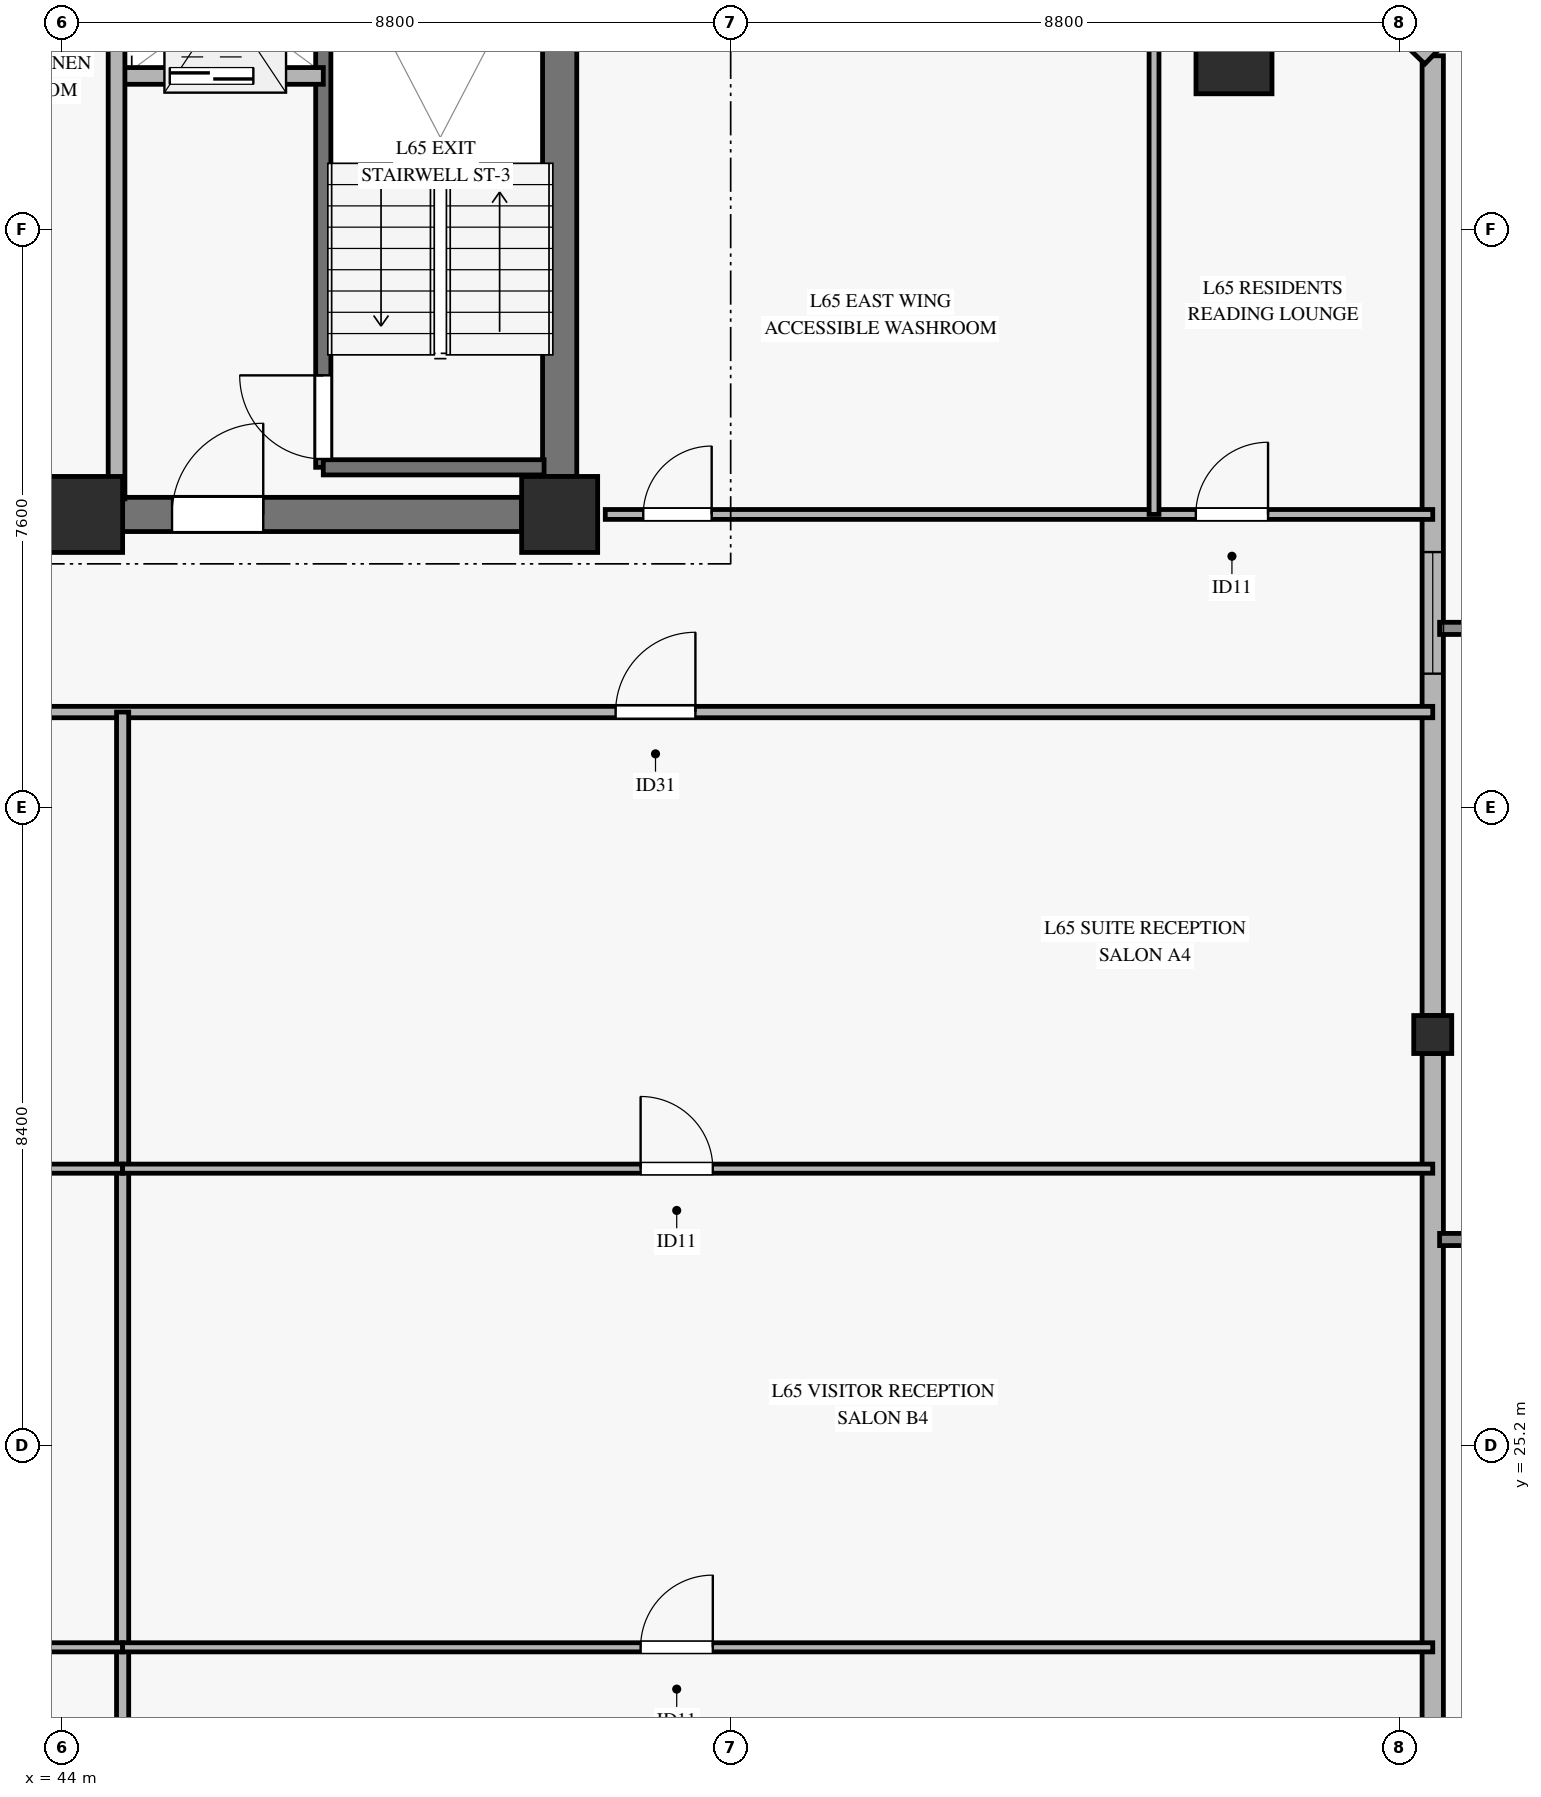
"""IFC4 building model, lengths in metres.
Left out: names, types, materials, properties, quantities, classifications, styles, units other than length and angle.
Written with IfcOpenShell. Run it as: python <this file> out.ifc"""

import sys

from ifc_helpers import new_model, si_unit, direction, frame, frame_2d, origin, origin_2d, place, context, subcontext, project, spatial, rectangle, hollow_rectangle, extrude, source, transform, mapped, element, fill, save


model = new_model("IFC4")
c1 = context("Model", 3, precision=1e-05, world=origin(), true_north=direction((0.0, 1.0)))
c2 = subcontext(c1, "Body", "Model", "MODEL_VIEW")
j1 = project(units=[si_unit("LENGTHUNIT", "METRE"), si_unit("PLANEANGLEUNIT", "RADIAN")], contexts=[c1])
p1 = place(None, origin())
s1 = spatial("IfcSite", under=j1, at=p1, CompositionType="ELEMENT")
p2 = place(p1, origin())
s2 = spatial("IfcBuilding", under=s1, at=p2, CompositionType="ELEMENT")
p3 = place(p2, frame((0.0, 0.0, 255.3)))
s3 = spatial("IfcBuildingStorey", under=s2, at=p3, CompositionType="ELEMENT", Elevation=255.3)
m1 = source(origin(), c2, "Body", "SweptSolid", [
    extrude(rectangle(XDim=1.0, YDim=1.0, at=origin_2d()), origin(), (0.0, 0.0, 1.0), 3.185),
])
for number, where, z_axis, x_axis in (
    (1, (44.3, 37.45, 0.0), (0.0, 0.0, 1.0), (1.0, 0.0, 0.0)),
    (2, (50.55, 37.45, 0.0), (0.0, 0.0, 1.0), (1.0, 0.0, 0.0)),
):
    element("IfcColumn", number, at=place(p3, frame(where, z_axis=z_axis, x_axis=x_axis)), inside=s3, PredefinedType="PILASTER", context=c2, shape_type="MappedRepresentation", body=[
        mapped(m1, transform((0.0, 0.0, 0.0), x_axis=(1.0, 0.0, 0.0), y_axis=(0.0, 1.0, 0.0), z_axis=(0.0, 0.0, 1.0), scale=1.0)),
    ])
p4 = place(p3, frame((44.8, 37.45, 0.0), z_axis=(0.0, 0.0, 1.0), x_axis=(1.0, 0.0, 0.0)))
e3 = element("IfcWall", 3, at=p4, inside=s3, PredefinedType="SHEAR", context=c2, shape_type="SweptSolid", body=[
    extrude(rectangle(XDim=5.25, YDim=0.45, at=frame_2d((2.625, 0.0))), origin(), (0.0, 0.0, 1.0), 3.185),
])
p5 = place(p4, frame((0.65, 0.0, 0.0)))
e4 = element("IfcOpeningElement", 4, at=p5, cuts=e3, PredefinedType="OPENING", context=c2, shape_type="SweptSolid", body=[
    extrude(rectangle(XDim=1.2, YDim=2.15, at=frame_2d((0.6, 1.075))), frame((0.0, 0.235, 0.0), z_axis=(0.0, -1.0, 0.0), x_axis=(1.0, 0.0, 0.0)), (0.0, 0.0, 1.0), 0.47),
])
p6 = place(p3, frame((50.55, 37.95, 0.0), z_axis=(0.0, 0.0, 1.0), x_axis=(0.0, 1.0, 0.0)))
e5 = element("IfcWall", 5, at=p6, inside=s3, PredefinedType="SHEAR", context=c2, shape_type="SweptSolid", body=[
    extrude(rectangle(XDim=8.1, YDim=0.45, at=frame_2d((4.05, 0.0))), origin(), (0.0, 0.0, 1.0), 3.185),
])
m2 = source(origin(), c2, "Body", "SweptSolid", [
    extrude(hollow_rectangle(XDim=1.0, YDim=1.0, WallThickness=0.045, at=origin_2d()), origin(), (0.0, 0.0, 1.0), 3.207),
])
p7 = place(p3, frame((59.422, 43.485, 0.0), z_axis=(-0.115115667947, 0.014008784988, 0.993253309552), x_axis=(-0.120801918231, -0.99267663242, 0.0)))
e6 = element("IfcColumn", 6, at=p7, inside=s3, PredefinedType="COLUMN", context=c2, shape_type="MappedRepresentation", body=[
    mapped(m2, transform((0.0, 0.0, 0.0), x_axis=(1.0, 0.0, 0.0), y_axis=(0.0, 1.0, 0.0), z_axis=(0.0, 0.0, 1.0), scale=1.0)),
])
m3 = source(origin(), c2, "Body", "SweptSolid", [
    extrude(hollow_rectangle(XDim=0.5, YDim=0.5, WallThickness=0.024, at=origin_2d()), origin(), (0.0, 0.0, 1.0), 3.245),
])
p8 = place(p3, frame((62.037, 30.607, 0.0), z_axis=(-0.12788204807, 0.143303118572, 0.981381881832), x_axis=(-0.7461113674, -0.665821167759, 0.0)))
e7 = element("IfcColumn", 7, at=p8, inside=s3, PredefinedType="COLUMN", context=c2, shape_type="MappedRepresentation", body=[
    mapped(m3, transform((0.0, 0.0, 0.0), x_axis=(1.0, 0.0, 0.0), y_axis=(0.0, 1.0, 0.0), z_axis=(0.0, 0.0, 1.0), scale=1.0)),
])
p9 = place(p3, frame((62.037, 17.728, 0.0), z_axis=(0.0, 0.0, 1.0), x_axis=(0.0, 1.0, 0.0)))
e8 = element("IfcWall", 8, at=p9, inside=s3, PredefinedType="SOLIDWALL", context=c2, shape_type="SweptSolid", body=[
    extrude(rectangle(XDim=12.629, YDim=0.28, at=frame_2d((6.314, 0.0))), origin(), (0.0, 0.0, 1.0), 2.815),
])
p10 = place(p3, frame((62.037, 30.857, 0.0), z_axis=(0.0, 0.0, 1.0), x_axis=(0.0, 1.0, 0.0)))
e9 = element("IfcWall", 9, at=p10, inside=s3, PredefinedType="SOLIDWALL", context=c2, shape_type="SweptSolid", body=[
    extrude(rectangle(XDim=12.628, YDim=0.28, at=frame_2d((6.314, 0.0))), origin(), (0.0, 0.0, 1.0), 2.815),
])
p11 = place(p10, frame((4.498, 0.0, 0.45)))
e10 = element("IfcOpeningElement", 10, at=p11, cuts=e9, PredefinedType="OPENING", context=c2, shape_type="SweptSolid", body=[
    extrude(rectangle(XDim=1.6, YDim=2.0, at=frame_2d((0.8, 1.0))), frame((0.0, 0.15, 0.0), z_axis=(0.0, -1.0, 0.0), x_axis=(1.0, 0.0, 0.0)), (0.0, 0.0, 1.0), 0.3),
])
p12 = place(p3, frame((62.037, 43.485, 0.0), z_axis=(0.0, 0.0, 1.0), x_axis=(-0.719565206503, 0.694424879731, 0.0)))
e11 = element("IfcWall", 11, at=p12, inside=s3, PredefinedType="SOLIDWALL", context=c2, shape_type="SweptSolid", body=[
    extrude(rectangle(XDim=3.981, YDim=0.3, at=frame_2d((1.991, 0.0))), origin(), (0.0, 0.0, 1.0), 2.815),
])
p13 = place(p12, frame((1.191, 0.0, 0.45)))
e12 = element("IfcOpeningElement", 12, at=p13, cuts=e11, PredefinedType="OPENING", context=c2, shape_type="SweptSolid", body=[
    extrude(rectangle(XDim=1.6, YDim=2.0, at=frame_2d((0.8, 1.0))), frame((0.0, 0.16, 0.0), z_axis=(0.0, -1.0, 0.0), x_axis=(1.0, 0.0, 0.0)), (0.0, 0.0, 1.0), 0.32),
])
p14 = place(p3, frame((47.44, 38.07, 0.0), z_axis=(0.0, 0.0, 1.0), x_axis=(0.0, 1.0, 0.0)))
e13 = element("IfcWall", 13, at=p14, inside=s3, PredefinedType="SOLIDWALL", context=c2, shape_type="SweptSolid", body=[
    extrude(rectangle(XDim=7.25, YDim=0.2, at=frame_2d((3.625, 0.0))), origin(), (0.0, 0.0, 1.0), 3.4),
])
p15 = place(p14, frame((0.11, 0.0, 0.0)))
e14 = element("IfcOpeningElement", 14, at=p15, cuts=e13, PredefinedType="OPENING", context=c2, shape_type="SweptSolid", body=[
    extrude(rectangle(XDim=1.1, YDim=2.15, at=frame_2d((0.55, 1.075))), frame((0.0, 0.11, 0.0), z_axis=(0.0, -1.0, 0.0), x_axis=(1.0, 0.0, 0.0)), (0.0, 0.0, 1.0), 0.22),
])
p16 = place(p3, frame((47.44, 38.07, 0.0), z_axis=(0.0, 0.0, 1.0), x_axis=(1.0, 0.0, 0.0)))
e15 = element("IfcWall", 15, at=p16, inside=s3, PredefinedType="SOLIDWALL", context=c2, shape_type="SweptSolid", body=[
    extrude(rectangle(XDim=2.905, YDim=0.2, at=frame_2d((1.453, 0.0))), origin(), (0.0, 0.0, 1.0), 3.4),
])
p17 = place(p3, frame((44.72, 43.22, 0.0), z_axis=(0.0, 0.0, 1.0), x_axis=(1.0, 0.0, 0.0)))
e16 = element("IfcWall", 16, at=p17, inside=s3, PredefinedType="SOLIDWALL", context=c2, shape_type="SweptSolid", body=[
    extrude(rectangle(XDim=2.72, YDim=0.22, at=frame_2d((1.36, 0.0))), origin(), (0.0, 0.0, 1.0), 3.185),
])
p18 = place(p17, frame((0.7, 0.0, 0.0)))
e17 = element("IfcOpeningElement", 17, at=p18, cuts=e16, PredefinedType="OPENING", context=c2, shape_type="SweptSolid", body=[
    extrude(rectangle(XDim=1.1, YDim=2.2, at=frame_2d((0.55, 1.1))), frame((0.0, 0.12, 0.0), z_axis=(0.0, -1.0, 0.0), x_axis=(1.0, 0.0, 0.0)), (0.0, 0.0, 1.0), 0.24),
])
p19 = place(p3, frame((44.72, 37.655, 0.0), z_axis=(0.0, 0.0, 1.0), x_axis=(0.0, 1.0, 0.0)))
e18 = element("IfcWall", 18, at=p19, inside=s3, PredefinedType="SOLIDWALL", context=c2, shape_type="SweptSolid", body=[
    extrude(rectangle(XDim=7.565, YDim=0.22, at=frame_2d((3.782, 0.0))), origin(), (0.0, 0.0, 1.0), 3.185),
])
p20 = place(p3, frame((8.364, 34.85, 0.0), z_axis=(0.0, 0.0, 1.0), x_axis=(1.0, 0.0, 0.0)))
e19 = element("IfcWall", 19, at=p20, inside=s3, PredefinedType="PARTITIONING", context=c2, shape_type="SweptSolid", body=[
    extrude(rectangle(XDim=53.673, YDim=0.15, at=frame_2d((26.836, 0.0))), origin(), (0.0, 0.0, 1.0), 2.47),
])
p21 = place(p20, frame((5.352, 0.0, 0.0)))
e20 = element("IfcOpeningElement", 20, at=p21, cuts=e19, PredefinedType="OPENING", context=c2, shape_type="SweptSolid", body=[
    extrude(rectangle(XDim=1.05, YDim=2.15, at=frame_2d((0.525, 1.075))), frame((0.0, 0.085, 0.0), z_axis=(0.0, -1.0, 0.0), x_axis=(1.0, 0.0, 0.0)), (0.0, 0.0, 1.0), 0.17),
])
p22 = place(p20, frame((17.517, 0.0, 0.0)))
e21 = element("IfcOpeningElement", 21, at=p22, cuts=e19, PredefinedType="OPENING", context=c2, shape_type="SweptSolid", body=[
    extrude(rectangle(XDim=1.05, YDim=2.15, at=frame_2d((0.525, 1.075))), frame((0.0, 0.085, 0.0), z_axis=(0.0, -1.0, 0.0), x_axis=(1.0, 0.0, 0.0)), (0.0, 0.0, 1.0), 0.17),
])
p23 = place(p20, frame((29.537, 0.0, 0.0)))
e22 = element("IfcOpeningElement", 22, at=p23, cuts=e19, PredefinedType="OPENING", context=c2, shape_type="SweptSolid", body=[
    extrude(rectangle(XDim=1.05, YDim=2.15, at=frame_2d((0.525, 1.075))), frame((0.0, 0.085, 0.0), z_axis=(0.0, -1.0, 0.0), x_axis=(1.0, 0.0, 0.0)), (0.0, 0.0, 1.0), 0.17),
])
p24 = place(p20, frame((42.922, 0.0, 0.0)))
e23 = element("IfcOpeningElement", 23, at=p24, cuts=e19, PredefinedType="OPENING", context=c2, shape_type="SweptSolid", body=[
    extrude(rectangle(XDim=1.05, YDim=2.15, at=frame_2d((0.525, 1.075))), frame((0.0, 0.085, 0.0), z_axis=(0.0, -1.0, 0.0), x_axis=(1.0, 0.0, 0.0)), (0.0, 0.0, 1.0), 0.17),
])
p25 = place(p3, frame((44.8, 15.113, 0.0), z_axis=(0.0, 0.0, 1.0), x_axis=(0.0, 1.0, 0.0)))
e24 = element("IfcWall", 24, at=p25, inside=s3, PredefinedType="PARTITIONING", context=c2, shape_type="SweptSolid", body=[
    extrude(rectangle(XDim=19.737, YDim=0.16, at=frame_2d((9.869, 0.0))), origin(), (0.0, 0.0, 1.0), 2.77),
])
p26 = place(p3, frame((33.4, 22.544, 0.0), z_axis=(0.0, 0.0, 1.0), x_axis=(1.0, 0.0, 0.0)))
e25 = element("IfcWall", 25, at=p26, inside=s3, PredefinedType="PARTITIONING", context=c2, shape_type="SweptSolid", body=[
    extrude(rectangle(XDim=11.4, YDim=0.12, at=frame_2d((5.7, 0.0))), origin(), (0.0, 0.0, 1.0), 2.47),
])
p27 = place(p26, frame((4.726, 0.0, 0.0)))
e26 = element("IfcOpeningElement", 26, at=p27, cuts=e25, PredefinedType="OPENING", context=c2, shape_type="SweptSolid", body=[
    extrude(rectangle(XDim=0.95, YDim=2.1, at=frame_2d((0.475, 1.05))), frame((0.0, 0.07, 0.0), z_axis=(0.0, -1.0, 0.0), x_axis=(1.0, 0.0, 0.0)), (0.0, 0.0, 1.0), 0.14),
])
p28 = place(p3, frame((33.4, 28.842, 0.0), z_axis=(0.0, 0.0, 1.0), x_axis=(1.0, 0.0, 0.0)))
e27 = element("IfcWall", 27, at=p28, inside=s3, PredefinedType="PARTITIONING", context=c2, shape_type="SweptSolid", body=[
    extrude(rectangle(XDim=11.4, YDim=0.12, at=frame_2d((5.7, 0.0))), origin(), (0.0, 0.0, 1.0), 2.47),
])
p29 = place(p28, frame((4.726, 0.0, 0.0)))
e28 = element("IfcOpeningElement", 28, at=p29, cuts=e27, PredefinedType="OPENING", context=c2, shape_type="SweptSolid", body=[
    extrude(rectangle(XDim=0.95, YDim=2.1, at=frame_2d((0.475, 1.05))), frame((0.0, 0.07, 0.0), z_axis=(0.0, -1.0, 0.0), x_axis=(1.0, 0.0, 0.0)), (0.0, 0.0, 1.0), 0.14),
])
p30 = place(p3, frame((44.8, 22.544, 0.0), z_axis=(0.0, 0.0, 1.0), x_axis=(1.0, 0.0, 0.0)))
e29 = element("IfcWall", 29, at=p30, inside=s3, PredefinedType="PARTITIONING", context=c2, shape_type="SweptSolid", body=[
    extrude(rectangle(XDim=17.237, YDim=0.12, at=frame_2d((8.619, 0.0))), origin(), (0.0, 0.0, 1.0), 2.47),
])
p31 = place(p30, frame((6.815, 0.0, 0.0)))
e30 = element("IfcOpeningElement", 30, at=p31, cuts=e29, PredefinedType="OPENING", context=c2, shape_type="SweptSolid", body=[
    extrude(rectangle(XDim=0.95, YDim=2.1, at=frame_2d((0.475, 1.05))), frame((0.0, 0.07, 0.0), z_axis=(0.0, -1.0, 0.0), x_axis=(1.0, 0.0, 0.0)), (0.0, 0.0, 1.0), 0.14),
])
p32 = place(p3, frame((44.8, 28.842, 0.0), z_axis=(0.0, 0.0, 1.0), x_axis=(1.0, 0.0, 0.0)))
e31 = element("IfcWall", 31, at=p32, inside=s3, PredefinedType="PARTITIONING", context=c2, shape_type="SweptSolid", body=[
    extrude(rectangle(XDim=17.237, YDim=0.12, at=frame_2d((8.619, 0.0))), origin(), (0.0, 0.0, 1.0), 2.47),
])
p33 = place(p32, frame((6.815, 0.0, 0.0)))
e32 = element("IfcOpeningElement", 32, at=p33, cuts=e31, PredefinedType="OPENING", context=c2, shape_type="SweptSolid", body=[
    extrude(rectangle(XDim=0.95, YDim=2.1, at=frame_2d((0.475, 1.05))), frame((0.0, 0.07, 0.0), z_axis=(0.0, -1.0, 0.0), x_axis=(1.0, 0.0, 0.0)), (0.0, 0.0, 1.0), 0.14),
])
p34 = place(p3, frame((51.15, 37.45, 0.0), z_axis=(0.0, 0.0, 1.0), x_axis=(1.0, 0.0, 0.0)))
e33 = element("IfcWall", 33, at=p34, inside=s3, PredefinedType="PARTITIONING", context=c2, shape_type="SweptSolid", body=[
    extrude(rectangle(XDim=10.887, YDim=0.13, at=frame_2d((5.444, 0.0))), origin(), (0.0, 0.0, 1.0), 2.82),
])
p35 = place(p34, frame((0.5, 0.0, 0.0)))
e34 = element("IfcOpeningElement", 34, at=p35, cuts=e33, PredefinedType="OPENING", context=c2, shape_type="SweptSolid", body=[
    extrude(rectangle(XDim=0.9, YDim=2.1, at=frame_2d((0.45, 1.05))), frame((0.0, 0.075, 0.0), z_axis=(0.0, -1.0, 0.0), x_axis=(1.0, 0.0, 0.0)), (0.0, 0.0, 1.0), 0.15),
])
p36 = place(p34, frame((7.77, 0.0, 0.0)))
e35 = element("IfcOpeningElement", 35, at=p36, cuts=e33, PredefinedType="OPENING", context=c2, shape_type="SweptSolid", body=[
    extrude(rectangle(XDim=0.95, YDim=2.1, at=frame_2d((0.475, 1.05))), frame((0.0, 0.075, 0.0), z_axis=(0.0, -1.0, 0.0), x_axis=(1.0, 0.0, 0.0)), (0.0, 0.0, 1.0), 0.15),
])
p37 = place(p3, frame((58.37, 37.45, 0.0), z_axis=(0.0, 0.0, 1.0), x_axis=(0.0, 1.0, 0.0)))
e36 = element("IfcWall", 36, at=p37, inside=s3, PredefinedType="PARTITIONING", context=c2, shape_type="SweptSolid", body=[
    extrude(rectangle(XDim=8.8, YDim=0.13, at=frame_2d((4.4, 0.0))), origin(), (0.0, 0.0, 1.0), 3.185),
])
m4 = source(origin(), c2, "Body", "SweptSolid", [
    extrude(rectangle(XDim=1.6, YDim=2.0, at=frame_2d((0.8, 1.0))), frame((0.0, 0.03, 0.0), z_axis=(0.0, -1.0, 0.0), x_axis=(1.0, 0.0, 0.0)), (0.0, 0.0, 1.0), 0.06),
])
p38 = place(p11, origin())
e37 = element("IfcWindow", 37, at=p38, inside=s3, PartitioningType="SINGLE_PANEL", PredefinedType="WINDOW", context=c2, shape_type="MappedRepresentation", body=[
    mapped(m4, transform((0.0, 0.0, 0.0), x_axis=(1.0, 0.0, 0.0), y_axis=(0.0, 1.0, 0.0), z_axis=(0.0, 0.0, 1.0), scale=1.0)),
])
fill(e10, e37)
m5 = source(origin(), c2, "Body", "SweptSolid", [
    extrude(rectangle(XDim=1.1, YDim=2.15, at=frame_2d((0.55, 1.075))), frame((0.0, 0.025, 0.0), z_axis=(0.0, -1.0, 0.0), x_axis=(1.0, 0.0, 0.0)), (0.0, 0.0, 1.0), 0.05),
])
p39 = place(p15, origin())
e38 = element("IfcDoor", 38, at=p39, inside=s3, OperationType="SINGLE_SWING_RIGHT", PredefinedType="DOOR", context=c2, shape_type="MappedRepresentation", body=[
    mapped(m5, transform((0.0, 0.0, 0.0), x_axis=(1.0, 0.0, 0.0), y_axis=(0.0, 1.0, 0.0), z_axis=(0.0, 0.0, 1.0), scale=1.0)),
])
fill(e14, e38)
m6 = source(origin(), c2, "Body", "SweptSolid", [
    extrude(rectangle(XDim=1.1, YDim=2.2, at=frame_2d((0.55, 1.1))), frame((0.0, 0.025, 0.0), z_axis=(0.0, -1.0, 0.0), x_axis=(1.0, 0.0, 0.0)), (0.0, 0.0, 1.0), 0.05),
])
p40 = place(p18, origin())
e39 = element("IfcDoor", 39, at=p40, inside=s3, OperationType="SLIDING_TO_LEFT", PredefinedType="DOOR", context=c2, shape_type="MappedRepresentation", body=[
    mapped(m6, transform((0.0, 0.0, 0.0), x_axis=(1.0, 0.0, 0.0), y_axis=(0.0, 1.0, 0.0), z_axis=(0.0, 0.0, 1.0), scale=1.0)),
])
fill(e17, e39)
m7 = source(origin(), c2, "Body", "SweptSolid", [
    extrude(rectangle(XDim=1.2, YDim=2.15, at=frame_2d((0.6, 1.075))), frame((0.0, 0.025, 0.0), z_axis=(0.0, -1.0, 0.0), x_axis=(1.0, 0.0, 0.0)), (0.0, 0.0, 1.0), 0.05),
])
p41 = place(p5, origin())
e40 = element("IfcDoor", 40, at=p41, inside=s3, OperationType="SINGLE_SWING_RIGHT", PredefinedType="DOOR", context=c2, shape_type="MappedRepresentation", body=[
    mapped(m7, transform((0.0, 0.0, 0.0), x_axis=(1.0, 0.0, 0.0), y_axis=(0.0, 1.0, 0.0), z_axis=(0.0, 0.0, 1.0), scale=1.0)),
])
fill(e4, e40)
m8 = source(origin(), c2, "Body", "SweptSolid", [
    extrude(rectangle(XDim=1.05, YDim=2.15, at=frame_2d((0.525, 1.075))), frame((0.0, 0.025, 0.0), z_axis=(0.0, -1.0, 0.0), x_axis=(1.0, 0.0, 0.0)), (0.0, 0.0, 1.0), 0.05),
])
p42 = place(p24, origin())
e41 = element("IfcDoor", 41, at=p42, inside=s3, OperationType="SINGLE_SWING_RIGHT", PredefinedType="DOOR", context=c2, shape_type="MappedRepresentation", body=[
    mapped(m8, transform((0.0, 0.0, 0.0), x_axis=(1.0, 0.0, 0.0), y_axis=(0.0, 1.0, 0.0), z_axis=(0.0, 0.0, 1.0), scale=1.0)),
])
fill(e23, e41)
m9 = source(origin(), c2, "Body", "SweptSolid", [
    extrude(rectangle(XDim=0.95, YDim=2.1, at=frame_2d((0.475, 1.05))), frame((0.0, 0.025, 0.0), z_axis=(0.0, -1.0, 0.0), x_axis=(1.0, 0.0, 0.0)), (0.0, 0.0, 1.0), 0.05),
])
p43 = place(p33, origin())
e42 = element("IfcDoor", 42, at=p43, inside=s3, OperationType="SINGLE_SWING_LEFT", PredefinedType="DOOR", context=c2, shape_type="MappedRepresentation", body=[
    mapped(m9, transform((0.0, 0.0, 0.0), x_axis=(1.0, 0.0, 0.0), y_axis=(0.0, 1.0, 0.0), z_axis=(0.0, 0.0, 1.0), scale=1.0)),
])
fill(e32, e42)
p44 = place(p31, origin())
e43 = element("IfcDoor", 43, at=p44, inside=s3, OperationType="SINGLE_SWING_RIGHT", PredefinedType="DOOR", context=c2, shape_type="MappedRepresentation", body=[
    mapped(m9, transform((0.0, 0.0, 0.0), x_axis=(1.0, 0.0, 0.0), y_axis=(0.0, 1.0, 0.0), z_axis=(0.0, 0.0, 1.0), scale=1.0)),
])
fill(e30, e43)
m10 = source(origin(), c2, "Body", "SweptSolid", [
    extrude(rectangle(XDim=0.9, YDim=2.1, at=frame_2d((0.45, 1.05))), frame((0.0, 0.025, 0.0), z_axis=(0.0, -1.0, 0.0), x_axis=(1.0, 0.0, 0.0)), (0.0, 0.0, 1.0), 0.05),
])
p45 = place(p35, origin())
e44 = element("IfcDoor", 44, at=p45, inside=s3, OperationType="SINGLE_SWING_RIGHT", PredefinedType="DOOR", context=c2, shape_type="MappedRepresentation", body=[
    mapped(m10, transform((0.0, 0.0, 0.0), x_axis=(1.0, 0.0, 0.0), y_axis=(0.0, 1.0, 0.0), z_axis=(0.0, 0.0, 1.0), scale=1.0)),
])
fill(e34, e44)
p46 = place(p36, origin())
e45 = element("IfcDoor", 45, at=p46, inside=s3, OperationType="SINGLE_SWING_RIGHT", PredefinedType="DOOR", context=c2, shape_type="MappedRepresentation", body=[
    mapped(m9, transform((0.0, 0.0, 0.0), x_axis=(1.0, 0.0, 0.0), y_axis=(0.0, 1.0, 0.0), z_axis=(0.0, 0.0, 1.0), scale=1.0)),
])
fill(e35, e45)
save(model, sys.argv[1])
